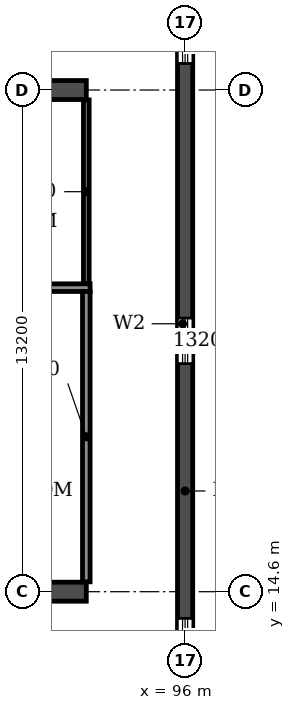
"""IFC4 building model, lengths in metres.
Left out: names, types, materials, properties, quantities, classifications, styles, units other than length and angle.
Written with IfcOpenShell. Run it as: python <this file> out.ifc"""

import sys

from ifc_helpers import new_model, si_unit, direction, frame, frame_2d, origin, place, context, subcontext, project, spatial, rectangle, extrude, element, fill, save


model = new_model("IFC4")
c1 = context("Model", 3, precision=1e-05, world=origin(), true_north=direction((0.0, 1.0)))
c2 = subcontext(c1, "Body", "Model", "MODEL_VIEW")
j1 = project(units=[si_unit("LENGTHUNIT", "METRE"), si_unit("PLANEANGLEUNIT", "RADIAN")], contexts=[c1])
p1 = place(None, origin())
s1 = spatial("IfcSite", under=j1, at=p1, CompositionType="ELEMENT")
p2 = place(p1, origin())
s2 = spatial("IfcBuilding", under=s1, at=p2, CompositionType="ELEMENT")
p3 = place(p2, frame((0.0, 0.0, 76.2)))
s3 = spatial("IfcBuildingStorey", under=s2, at=p3, CompositionType="ELEMENT", Elevation=76.2)
p4 = place(p3, frame((96.0, 4.683, 0.0), z_axis=(0.0, 0.0, 1.0), x_axis=(0.0, 1.0, 0.0)))
e1 = element("IfcWall", 1, at=p4, inside=s3, PredefinedType="SHEAR", context=c2, shape_type="SweptSolid", body=[
    extrude(rectangle(XDim=34.234, YDim=0.4, at=frame_2d((17.117, 0.0))), origin(), (0.0, 0.0, 1.0), 3.06),
])
p5 = place(p4, frame((15.917, 0.0, 0.9)))
e2 = element("IfcOpeningElement", 2, at=p5, cuts=e1, PredefinedType="OPENING", context=c2, shape_type="SweptSolid", body=[
    extrude(rectangle(XDim=1.2, YDim=1.5, at=frame_2d((0.6, 0.75))), frame((0.0, 0.21, 0.0), z_axis=(0.0, -1.0, 0.0), x_axis=(1.0, 0.0, 0.0)), (0.0, 0.0, 1.0), 0.42),
])
p6 = place(p4, frame((23.817, 0.0, 0.9)))
e3 = element("IfcOpeningElement", 3, at=p6, cuts=e1, PredefinedType="OPENING", context=c2, shape_type="SweptSolid", body=[
    extrude(rectangle(XDim=1.2, YDim=1.5, at=frame_2d((0.6, 0.75))), frame((0.0, 0.21, 0.0), z_axis=(0.0, -1.0, 0.0), x_axis=(1.0, 0.0, 0.0)), (0.0, 0.0, 1.0), 0.42),
])
p7 = place(p4, frame((8.017, 0.0, 0.9)))
e4 = element("IfcOpeningElement", 4, at=p7, cuts=e1, PredefinedType="OPENING", context=c2, shape_type="SweptSolid", body=[
    extrude(rectangle(XDim=1.2, YDim=1.5, at=frame_2d((0.6, 0.75))), frame((0.0, 0.21, 0.0), z_axis=(0.0, -1.0, 0.0), x_axis=(1.0, 0.0, 0.0)), (0.0, 0.0, 1.0), 0.42),
])
p8 = place(p4, frame((28.894, 0.0, 0.6)))
e5 = element("IfcOpeningElement", 5, at=p8, cuts=e1, PredefinedType="OPENING", context=c2, shape_type="SweptSolid", body=[
    extrude(rectangle(XDim=2.2, YDim=1.8, at=frame_2d((1.1, 0.9))), frame((0.0, 0.21, 0.0), z_axis=(0.0, -1.0, 0.0), x_axis=(1.0, 0.0, 0.0)), (0.0, 0.0, 1.0), 0.42),
])
p9 = place(p4, frame((2.541, 0.0, 0.6)))
e6 = element("IfcOpeningElement", 6, at=p9, cuts=e1, PredefinedType="OPENING", context=c2, shape_type="SweptSolid", body=[
    extrude(rectangle(XDim=2.2, YDim=1.8, at=frame_2d((1.1, 0.9))), frame((0.0, 0.21, 0.0), z_axis=(0.0, -1.0, 0.0), x_axis=(1.0, 0.0, 0.0)), (0.0, 0.0, 1.0), 0.42),
])
p10 = place(p3, frame((8.6, 14.6, 0.0), z_axis=(0.0, 0.0, 1.0), x_axis=(1.0, 0.0, 0.0)))
e7 = element("IfcWall", 7, at=p10, inside=s3, PredefinedType="SOLIDWALL", context=c2, shape_type="SweptSolid", body=[
    extrude(rectangle(XDim=84.8, YDim=0.5, at=frame_2d((42.4, 0.0))), origin(), (0.0, 0.0, 1.0), 3.06),
])
p11 = place(p10, frame((2.25, 0.0, 0.0)))
e8 = element("IfcOpeningElement", 8, at=p11, cuts=e7, PredefinedType="OPENING", context=c2, shape_type="SweptSolid", body=[
    extrude(rectangle(XDim=1.0, YDim=2.1, at=frame_2d((0.5, 1.05))), frame((0.0, 0.26, 0.0), z_axis=(0.0, -1.0, 0.0), x_axis=(1.0, 0.0, 0.0)), (0.0, 0.0, 1.0), 0.52),
])
p12 = place(p10, frame((6.95, 0.0, 0.0)))
e9 = element("IfcOpeningElement", 9, at=p12, cuts=e7, PredefinedType="OPENING", context=c2, shape_type="SweptSolid", body=[
    extrude(rectangle(XDim=1.0, YDim=2.1, at=frame_2d((0.5, 1.05))), frame((0.0, 0.26, 0.0), z_axis=(0.0, -1.0, 0.0), x_axis=(1.0, 0.0, 0.0)), (0.0, 0.0, 1.0), 0.52),
])
p13 = place(p10, frame((10.3, 0.0, 0.0)))
e10 = element("IfcOpeningElement", 10, at=p13, cuts=e7, PredefinedType="OPENING", context=c2, shape_type="SweptSolid", body=[
    extrude(rectangle(XDim=1.0, YDim=2.1, at=frame_2d((0.5, 1.05))), frame((0.0, 0.26, 0.0), z_axis=(0.0, -1.0, 0.0), x_axis=(1.0, 0.0, 0.0)), (0.0, 0.0, 1.0), 0.52),
])
p14 = place(p10, frame((18.2, 0.0, 0.0)))
e11 = element("IfcOpeningElement", 11, at=p14, cuts=e7, PredefinedType="OPENING", context=c2, shape_type="SweptSolid", body=[
    extrude(rectangle(XDim=1.0, YDim=2.1, at=frame_2d((0.5, 1.05))), frame((0.0, 0.26, 0.0), z_axis=(0.0, -1.0, 0.0), x_axis=(1.0, 0.0, 0.0)), (0.0, 0.0, 1.0), 0.52),
])
p15 = place(p10, frame((22.8, 0.0, 0.0)))
e12 = element("IfcOpeningElement", 12, at=p15, cuts=e7, PredefinedType="OPENING", context=c2, shape_type="SweptSolid", body=[
    extrude(rectangle(XDim=1.0, YDim=2.1, at=frame_2d((0.5, 1.05))), frame((0.0, 0.26, 0.0), z_axis=(0.0, -1.0, 0.0), x_axis=(1.0, 0.0, 0.0)), (0.0, 0.0, 1.0), 0.52),
])
p16 = place(p10, frame((35.4, 0.0, 0.0)))
e13 = element("IfcOpeningElement", 13, at=p16, cuts=e7, PredefinedType="OPENING", context=c2, shape_type="SweptSolid", body=[
    extrude(rectangle(XDim=1.0, YDim=2.1, at=frame_2d((0.5, 1.05))), frame((0.0, 0.26, 0.0), z_axis=(0.0, -1.0, 0.0), x_axis=(1.0, 0.0, 0.0)), (0.0, 0.0, 1.0), 0.52),
])
p17 = place(p10, frame((39.3, 0.0, 0.0)))
e14 = element("IfcOpeningElement", 14, at=p17, cuts=e7, PredefinedType="OPENING", context=c2, shape_type="SweptSolid", body=[
    extrude(rectangle(XDim=1.0, YDim=2.1, at=frame_2d((0.5, 1.05))), frame((0.0, 0.26, 0.0), z_axis=(0.0, -1.0, 0.0), x_axis=(1.0, 0.0, 0.0)), (0.0, 0.0, 1.0), 0.52),
])
p18 = place(p10, frame((41.9, 0.0, 0.0)))
e15 = element("IfcOpeningElement", 15, at=p18, cuts=e7, PredefinedType="OPENING", context=c2, shape_type="SweptSolid", body=[
    extrude(rectangle(XDim=1.0, YDim=2.1, at=frame_2d((0.5, 1.05))), frame((0.0, 0.26, 0.0), z_axis=(0.0, -1.0, 0.0), x_axis=(1.0, 0.0, 0.0)), (0.0, 0.0, 1.0), 0.52),
])
p19 = place(p10, frame((44.5, 0.0, 0.0)))
e16 = element("IfcOpeningElement", 16, at=p19, cuts=e7, PredefinedType="OPENING", context=c2, shape_type="SweptSolid", body=[
    extrude(rectangle(XDim=1.0, YDim=2.1, at=frame_2d((0.5, 1.05))), frame((0.0, 0.26, 0.0), z_axis=(0.0, -1.0, 0.0), x_axis=(1.0, 0.0, 0.0)), (0.0, 0.0, 1.0), 0.52),
])
p20 = place(p10, frame((48.4, 0.0, 0.0)))
e17 = element("IfcOpeningElement", 17, at=p20, cuts=e7, PredefinedType="OPENING", context=c2, shape_type="SweptSolid", body=[
    extrude(rectangle(XDim=1.0, YDim=2.1, at=frame_2d((0.5, 1.05))), frame((0.0, 0.26, 0.0), z_axis=(0.0, -1.0, 0.0), x_axis=(1.0, 0.0, 0.0)), (0.0, 0.0, 1.0), 0.52),
])
p21 = place(p10, frame((61.0, 0.0, 0.0)))
e18 = element("IfcOpeningElement", 18, at=p21, cuts=e7, PredefinedType="OPENING", context=c2, shape_type="SweptSolid", body=[
    extrude(rectangle(XDim=1.0, YDim=2.1, at=frame_2d((0.5, 1.05))), frame((0.0, 0.26, 0.0), z_axis=(0.0, -1.0, 0.0), x_axis=(1.0, 0.0, 0.0)), (0.0, 0.0, 1.0), 0.52),
])
p22 = place(p10, frame((65.6, 0.0, 0.0)))
e19 = element("IfcOpeningElement", 19, at=p22, cuts=e7, PredefinedType="OPENING", context=c2, shape_type="SweptSolid", body=[
    extrude(rectangle(XDim=1.0, YDim=2.1, at=frame_2d((0.5, 1.05))), frame((0.0, 0.26, 0.0), z_axis=(0.0, -1.0, 0.0), x_axis=(1.0, 0.0, 0.0)), (0.0, 0.0, 1.0), 0.52),
])
p23 = place(p10, frame((73.5, 0.0, 0.0)))
e20 = element("IfcOpeningElement", 20, at=p23, cuts=e7, PredefinedType="OPENING", context=c2, shape_type="SweptSolid", body=[
    extrude(rectangle(XDim=1.0, YDim=2.1, at=frame_2d((0.5, 1.05))), frame((0.0, 0.26, 0.0), z_axis=(0.0, -1.0, 0.0), x_axis=(1.0, 0.0, 0.0)), (0.0, 0.0, 1.0), 0.52),
])
p24 = place(p10, frame((76.55, 0.0, 0.0)))
e21 = element("IfcOpeningElement", 21, at=p24, cuts=e7, PredefinedType="OPENING", context=c2, shape_type="SweptSolid", body=[
    extrude(rectangle(XDim=1.0, YDim=2.1, at=frame_2d((0.5, 1.05))), frame((0.0, 0.26, 0.0), z_axis=(0.0, -1.0, 0.0), x_axis=(1.0, 0.0, 0.0)), (0.0, 0.0, 1.0), 0.52),
])
p25 = place(p10, frame((81.0, 0.0, 0.0)))
e22 = element("IfcOpeningElement", 22, at=p25, cuts=e7, PredefinedType="OPENING", context=c2, shape_type="SweptSolid", body=[
    extrude(rectangle(XDim=1.5, YDim=2.1, at=frame_2d((0.75, 1.05))), frame((0.0, 0.26, 0.0), z_axis=(0.0, -1.0, 0.0), x_axis=(1.0, 0.0, 0.0)), (0.0, 0.0, 1.0), 0.52),
])
p26 = place(p3, frame((8.6, 27.8, 0.0), z_axis=(0.0, 0.0, 1.0), x_axis=(1.0, 0.0, 0.0)))
e23 = element("IfcWall", 23, at=p26, inside=s3, PredefinedType="SOLIDWALL", context=c2, shape_type="SweptSolid", body=[
    extrude(rectangle(XDim=84.8, YDim=0.5, at=frame_2d((42.4, 0.0))), origin(), (0.0, 0.0, 1.0), 3.06),
])
p27 = place(p26, frame((2.0, 0.0, 0.0)))
e24 = element("IfcOpeningElement", 24, at=p27, cuts=e23, PredefinedType="OPENING", context=c2, shape_type="SweptSolid", body=[
    extrude(rectangle(XDim=1.5, YDim=2.1, at=frame_2d((0.75, 1.05))), frame((0.0, 0.26, 0.0), z_axis=(0.0, -1.0, 0.0), x_axis=(1.0, 0.0, 0.0)), (0.0, 0.0, 1.0), 0.52),
])
p28 = place(p26, frame((6.95, 0.0, 0.0)))
e25 = element("IfcOpeningElement", 25, at=p28, cuts=e23, PredefinedType="OPENING", context=c2, shape_type="SweptSolid", body=[
    extrude(rectangle(XDim=1.0, YDim=2.1, at=frame_2d((0.5, 1.05))), frame((0.0, 0.26, 0.0), z_axis=(0.0, -1.0, 0.0), x_axis=(1.0, 0.0, 0.0)), (0.0, 0.0, 1.0), 0.52),
])
p29 = place(p26, frame((10.3, 0.0, 0.0)))
e26 = element("IfcOpeningElement", 26, at=p29, cuts=e23, PredefinedType="OPENING", context=c2, shape_type="SweptSolid", body=[
    extrude(rectangle(XDim=1.0, YDim=2.1, at=frame_2d((0.5, 1.05))), frame((0.0, 0.26, 0.0), z_axis=(0.0, -1.0, 0.0), x_axis=(1.0, 0.0, 0.0)), (0.0, 0.0, 1.0), 0.52),
])
p30 = place(p26, frame((13.65, 0.0, 0.0)))
e27 = element("IfcOpeningElement", 27, at=p30, cuts=e23, PredefinedType="OPENING", context=c2, shape_type="SweptSolid", body=[
    extrude(rectangle(XDim=0.9, YDim=2.1, at=frame_2d((0.45, 1.05))), frame((0.0, 0.26, 0.0), z_axis=(0.0, -1.0, 0.0), x_axis=(1.0, 0.0, 0.0)), (0.0, 0.0, 1.0), 0.52),
])
p31 = place(p26, frame((22.85, 0.0, 0.0)))
e28 = element("IfcOpeningElement", 28, at=p31, cuts=e23, PredefinedType="OPENING", context=c2, shape_type="SweptSolid", body=[
    extrude(rectangle(XDim=0.9, YDim=2.1, at=frame_2d((0.45, 1.05))), frame((0.0, 0.26, 0.0), z_axis=(0.0, -1.0, 0.0), x_axis=(1.0, 0.0, 0.0)), (0.0, 0.0, 1.0), 0.52),
])
p32 = place(p26, frame((26.0, 0.0, 0.0)))
e29 = element("IfcOpeningElement", 29, at=p32, cuts=e23, PredefinedType="OPENING", context=c2, shape_type="SweptSolid", body=[
    extrude(rectangle(XDim=1.0, YDim=2.1, at=frame_2d((0.5, 1.05))), frame((0.0, 0.26, 0.0), z_axis=(0.0, -1.0, 0.0), x_axis=(1.0, 0.0, 0.0)), (0.0, 0.0, 1.0), 0.52),
])
p33 = place(p26, frame((31.2, 0.0, 0.0)))
e30 = element("IfcOpeningElement", 30, at=p33, cuts=e23, PredefinedType="OPENING", context=c2, shape_type="SweptSolid", body=[
    extrude(rectangle(XDim=1.0, YDim=2.1, at=frame_2d((0.5, 1.05))), frame((0.0, 0.26, 0.0), z_axis=(0.0, -1.0, 0.0), x_axis=(1.0, 0.0, 0.0)), (0.0, 0.0, 1.0), 0.52),
])
p34 = place(p26, frame((39.0, 0.0, 0.0)))
e31 = element("IfcOpeningElement", 31, at=p34, cuts=e23, PredefinedType="OPENING", context=c2, shape_type="SweptSolid", body=[
    extrude(rectangle(XDim=1.0, YDim=2.1, at=frame_2d((0.5, 1.05))), frame((0.0, 0.26, 0.0), z_axis=(0.0, -1.0, 0.0), x_axis=(1.0, 0.0, 0.0)), (0.0, 0.0, 1.0), 0.52),
])
p35 = place(p26, frame((41.9, 0.0, 0.0)))
e32 = element("IfcOpeningElement", 32, at=p35, cuts=e23, PredefinedType="OPENING", context=c2, shape_type="SweptSolid", body=[
    extrude(rectangle(XDim=1.0, YDim=2.1, at=frame_2d((0.5, 1.05))), frame((0.0, 0.26, 0.0), z_axis=(0.0, -1.0, 0.0), x_axis=(1.0, 0.0, 0.0)), (0.0, 0.0, 1.0), 0.52),
])
p36 = place(p26, frame((44.8, 0.0, 0.0)))
e33 = element("IfcOpeningElement", 33, at=p36, cuts=e23, PredefinedType="OPENING", context=c2, shape_type="SweptSolid", body=[
    extrude(rectangle(XDim=1.0, YDim=2.1, at=frame_2d((0.5, 1.05))), frame((0.0, 0.26, 0.0), z_axis=(0.0, -1.0, 0.0), x_axis=(1.0, 0.0, 0.0)), (0.0, 0.0, 1.0), 0.52),
])
p37 = place(p26, frame((48.7, 0.0, 0.0)))
e34 = element("IfcOpeningElement", 34, at=p37, cuts=e23, PredefinedType="OPENING", context=c2, shape_type="SweptSolid", body=[
    extrude(rectangle(XDim=1.0, YDim=2.1, at=frame_2d((0.5, 1.05))), frame((0.0, 0.26, 0.0), z_axis=(0.0, -1.0, 0.0), x_axis=(1.0, 0.0, 0.0)), (0.0, 0.0, 1.0), 0.52),
])
p38 = place(p26, frame((55.2, 0.0, 0.0)))
e35 = element("IfcOpeningElement", 35, at=p38, cuts=e23, PredefinedType="OPENING", context=c2, shape_type="SweptSolid", body=[
    extrude(rectangle(XDim=1.0, YDim=2.1, at=frame_2d((0.5, 1.05))), frame((0.0, 0.26, 0.0), z_axis=(0.0, -1.0, 0.0), x_axis=(1.0, 0.0, 0.0)), (0.0, 0.0, 1.0), 0.52),
])
p39 = place(p26, frame((61.05, 0.0, 0.0)))
e36 = element("IfcOpeningElement", 36, at=p39, cuts=e23, PredefinedType="OPENING", context=c2, shape_type="SweptSolid", body=[
    extrude(rectangle(XDim=0.9, YDim=2.1, at=frame_2d((0.45, 1.05))), frame((0.0, 0.26, 0.0), z_axis=(0.0, -1.0, 0.0), x_axis=(1.0, 0.0, 0.0)), (0.0, 0.0, 1.0), 0.52),
])
p40 = place(p26, frame((70.25, 0.0, 0.0)))
e37 = element("IfcOpeningElement", 37, at=p40, cuts=e23, PredefinedType="OPENING", context=c2, shape_type="SweptSolid", body=[
    extrude(rectangle(XDim=0.9, YDim=2.1, at=frame_2d((0.45, 1.05))), frame((0.0, 0.26, 0.0), z_axis=(0.0, -1.0, 0.0), x_axis=(1.0, 0.0, 0.0)), (0.0, 0.0, 1.0), 0.52),
])
p41 = place(p26, frame((73.5, 0.0, 0.0)))
e38 = element("IfcOpeningElement", 38, at=p41, cuts=e23, PredefinedType="OPENING", context=c2, shape_type="SweptSolid", body=[
    extrude(rectangle(XDim=1.0, YDim=2.1, at=frame_2d((0.5, 1.05))), frame((0.0, 0.26, 0.0), z_axis=(0.0, -1.0, 0.0), x_axis=(1.0, 0.0, 0.0)), (0.0, 0.0, 1.0), 0.52),
])
p42 = place(p26, frame((76.25, 0.0, 0.0)))
e39 = element("IfcOpeningElement", 39, at=p42, cuts=e23, PredefinedType="OPENING", context=c2, shape_type="SweptSolid", body=[
    extrude(rectangle(XDim=1.0, YDim=2.1, at=frame_2d((0.5, 1.05))), frame((0.0, 0.26, 0.0), z_axis=(0.0, -1.0, 0.0), x_axis=(1.0, 0.0, 0.0)), (0.0, 0.0, 1.0), 0.52),
])
p43 = place(p26, frame((80.95, 0.0, 0.0)))
e40 = element("IfcOpeningElement", 40, at=p43, cuts=e23, PredefinedType="OPENING", context=c2, shape_type="SweptSolid", body=[
    extrude(rectangle(XDim=1.0, YDim=2.1, at=frame_2d((0.5, 1.05))), frame((0.0, 0.26, 0.0), z_axis=(0.0, -1.0, 0.0), x_axis=(1.0, 0.0, 0.0)), (0.0, 0.0, 1.0), 0.52),
])
p44 = place(p3, frame((93.4, 22.7, 0.0), z_axis=(0.0, 0.0, 1.0), x_axis=(0.0, 1.0, 0.0)))
e41 = element("IfcWall", 41, at=p44, inside=s3, PredefinedType="PARTITIONING", context=c2, shape_type="SweptSolid", body=[
    extrude(rectangle(XDim=4.84, YDim=0.15, at=frame_2d((2.42, 0.0))), origin(), (0.0, 0.0, 1.0), 3.06),
])
p45 = place(p3, frame((87.2, 22.6, 0.0), z_axis=(0.0, 0.0, 1.0), x_axis=(1.0, 0.0, 0.0)))
e42 = element("IfcWall", 42, at=p45, inside=s3, PredefinedType="PARTITIONING", context=c2, shape_type="SweptSolid", body=[
    extrude(rectangle(XDim=6.3, YDim=0.2, at=frame_2d((3.15, 0.0))), origin(), (0.0, 0.0, 1.0), 3.06),
])
p46 = place(p3, frame((93.4, 14.86, 0.0), z_axis=(0.0, 0.0, 1.0), x_axis=(0.0, 1.0, 0.0)))
e43 = element("IfcWall", 43, at=p46, inside=s3, PredefinedType="PARTITIONING", context=c2, shape_type="SweptSolid", body=[
    extrude(rectangle(XDim=7.64, YDim=0.2, at=frame_2d((3.82, 0.0))), origin(), (0.0, 0.0, 1.0), 3.06),
])
p47 = place(p5, origin())
e44 = element("IfcWindow", 44, at=p47, inside=s3, PartitioningType="SINGLE_PANEL", PredefinedType="WINDOW", context=c2, shape_type="SweptSolid", body=[
    extrude(rectangle(XDim=1.2, YDim=1.5, at=frame_2d((0.6, 0.75))), frame((0.0, 0.03, 0.0), z_axis=(0.0, -1.0, 0.0), x_axis=(1.0, 0.0, 0.0)), (0.0, 0.0, 1.0), 0.06),
])
fill(e2, e44)
p48 = place(p6, origin())
e45 = element("IfcWindow", 45, at=p48, inside=s3, PartitioningType="SINGLE_PANEL", PredefinedType="WINDOW", context=c2, shape_type="SweptSolid", body=[
    extrude(rectangle(XDim=1.2, YDim=1.5, at=frame_2d((0.6, 0.75))), frame((0.0, 0.03, 0.0), z_axis=(0.0, -1.0, 0.0), x_axis=(1.0, 0.0, 0.0)), (0.0, 0.0, 1.0), 0.06),
])
fill(e3, e45)
p49 = place(p7, origin())
e46 = element("IfcWindow", 46, at=p49, inside=s3, PartitioningType="SINGLE_PANEL", PredefinedType="WINDOW", context=c2, shape_type="SweptSolid", body=[
    extrude(rectangle(XDim=1.2, YDim=1.5, at=frame_2d((0.6, 0.75))), frame((0.0, 0.03, 0.0), z_axis=(0.0, -1.0, 0.0), x_axis=(1.0, 0.0, 0.0)), (0.0, 0.0, 1.0), 0.06),
])
fill(e4, e46)
save(model, sys.argv[1])
